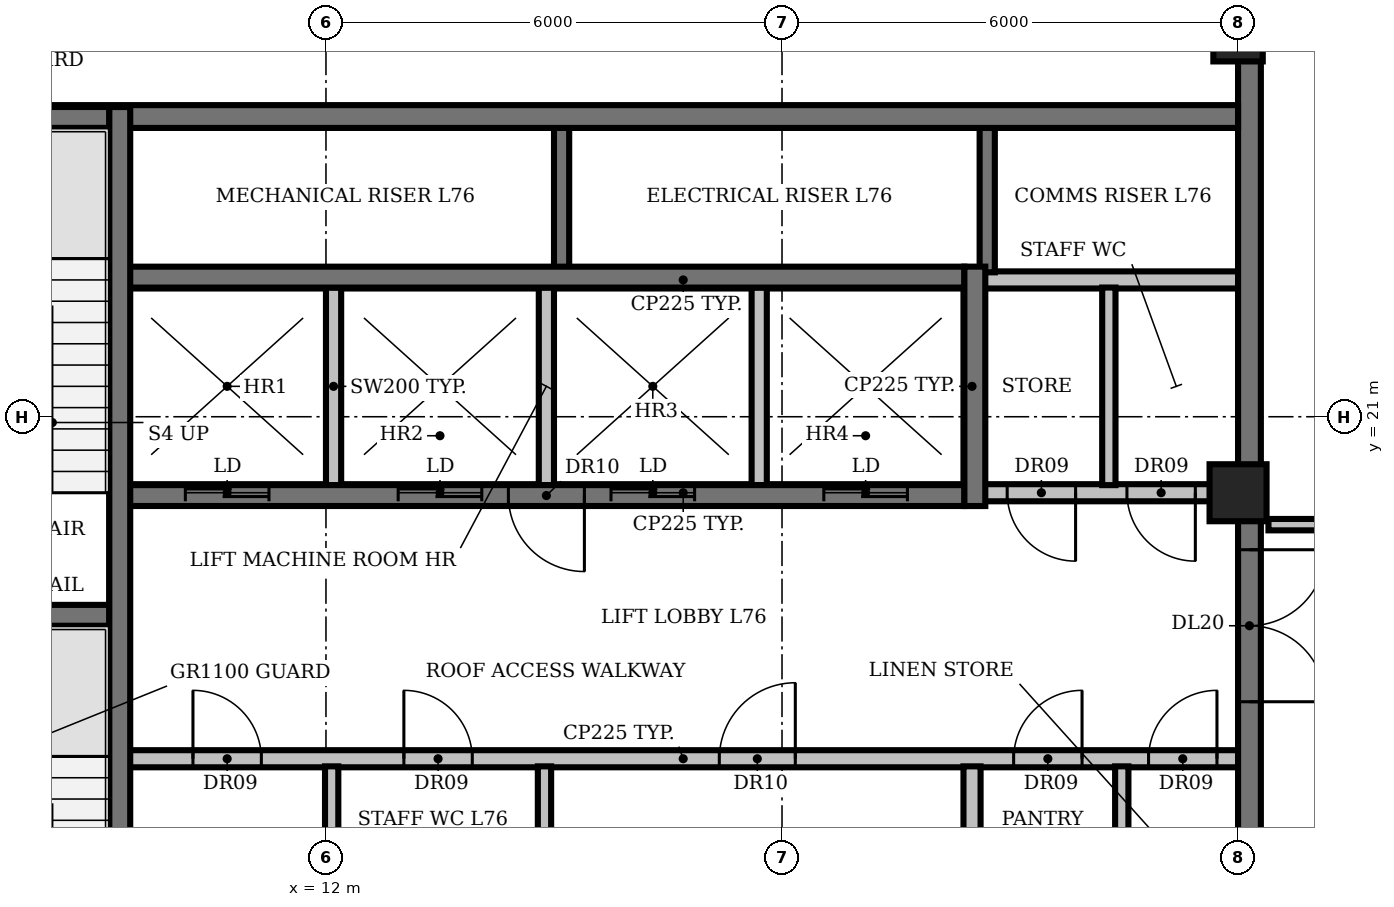
"""IFC4 building model, lengths in metres.
Left out: names, types, materials, properties, quantities, classifications, styles, units other than length and angle.
Written with IfcOpenShell. Run it as: python <this file> out.ifc"""

import sys

from ifc_helpers import new_model, si_unit, direction, frame, frame_2d, origin, origin_2d, place, context, subcontext, project, spatial, rectangle, circle, extrude, element, fill, save


model = new_model("IFC4")
c1 = context("Model", 3, precision=1e-05, world=origin(), true_north=direction((0.0, 1.0)))
c2 = subcontext(c1, "Body", "Model", "MODEL_VIEW")
j1 = project(units=[si_unit("LENGTHUNIT", "METRE"), si_unit("PLANEANGLEUNIT", "RADIAN")], contexts=[c1])
p1 = place(None, origin())
s1 = spatial("IfcSite", under=j1, at=p1, CompositionType="ELEMENT")
p2 = place(p1, origin())
s2 = spatial("IfcBuilding", under=s1, at=p2, CompositionType="ELEMENT")
p3 = place(p2, frame((0.0, 0.0, 339.8)))
s3 = spatial("IfcBuildingStorey", under=s2, at=p3, CompositionType="ELEMENT", Elevation=339.8)
p4 = place(p3, frame((24.0, 20.0, 0.0), z_axis=(0.0, 0.0, 1.0), x_axis=(1.0, 0.0, 0.0)))
e1 = element("IfcColumn", 1, at=p4, inside=s3, PredefinedType="COLUMN", context=c2, shape_type="SweptSolid", body=[
    extrude(circle(Radius=0.375, at=origin_2d()), origin(), (0.0, 0.0, 1.0), 3.9),
])
p5 = place(p3, frame((24.0, 26.0, 0.0), z_axis=(0.0, 0.0, 1.0), x_axis=(1.0, 0.0, 0.0)))
e2 = element("IfcColumn", 2, at=p5, inside=s3, PredefinedType="COLUMN", context=c2, shape_type="SweptSolid", body=[
    extrude(rectangle(XDim=0.65, YDim=0.65, at=origin_2d()), origin(), (0.0, 0.0, 1.0), 3.9),
])
p6 = place(p3, frame((9.4, 16.5, 0.0), z_axis=(0.0, 0.0, 1.0), x_axis=(1.0, 0.0, 0.0)))
e3 = element("IfcWall", 3, at=p6, inside=s3, PredefinedType="PARTITIONING", context=c2, shape_type="SweptSolid", body=[
    extrude(rectangle(XDim=14.6, YDim=0.225, at=frame_2d((7.3, 0.0))), origin(), (0.0, 0.0, 1.0), 3.9),
])
p7 = place(p6, frame((0.85, 0.0, 0.0)))
e4 = element("IfcOpeningElement", 4, at=p7, cuts=e3, PredefinedType="OPENING", context=c2, shape_type="SweptSolid", body=[
    extrude(rectangle(XDim=0.9, YDim=2.1, at=frame_2d((0.45, 1.05))), frame((0.0, 0.123, 0.0), z_axis=(0.0, -1.0, 0.0), x_axis=(1.0, 0.0, 0.0)), (0.0, 0.0, 1.0), 0.245),
])
p8 = place(p6, frame((3.625, 0.0, 0.0)))
e5 = element("IfcOpeningElement", 5, at=p8, cuts=e3, PredefinedType="OPENING", context=c2, shape_type="SweptSolid", body=[
    extrude(rectangle(XDim=0.9, YDim=2.1, at=frame_2d((0.45, 1.05))), frame((0.0, 0.123, 0.0), z_axis=(0.0, -1.0, 0.0), x_axis=(1.0, 0.0, 0.0)), (0.0, 0.0, 1.0), 0.245),
])
p9 = place(p6, frame((7.775, 0.0, 0.0)))
e6 = element("IfcOpeningElement", 6, at=p9, cuts=e3, PredefinedType="OPENING", context=c2, shape_type="SweptSolid", body=[
    extrude(rectangle(XDim=1.0, YDim=2.1, at=frame_2d((0.5, 1.05))), frame((0.0, 0.123, 0.0), z_axis=(0.0, -1.0, 0.0), x_axis=(1.0, 0.0, 0.0)), (0.0, 0.0, 1.0), 0.245),
])
p10 = place(p6, frame((11.647, 0.0, 0.0)))
e7 = element("IfcOpeningElement", 7, at=p10, cuts=e3, PredefinedType="OPENING", context=c2, shape_type="SweptSolid", body=[
    extrude(rectangle(XDim=0.9, YDim=2.1, at=frame_2d((0.45, 1.05))), frame((0.0, 0.123, 0.0), z_axis=(0.0, -1.0, 0.0), x_axis=(1.0, 0.0, 0.0)), (0.0, 0.0, 1.0), 0.245),
])
p11 = place(p6, frame((13.423, 0.0, 0.0)))
e8 = element("IfcOpeningElement", 8, at=p11, cuts=e3, PredefinedType="OPENING", context=c2, shape_type="SweptSolid", body=[
    extrude(rectangle(XDim=0.9, YDim=2.1, at=frame_2d((0.45, 1.05))), frame((0.0, 0.123, 0.0), z_axis=(0.0, -1.0, 0.0), x_axis=(1.0, 0.0, 0.0)), (0.0, 0.0, 1.0), 0.245),
])
p12 = place(p3, frame((6.0, 18.375, 0.0), z_axis=(0.0, 0.0, 1.0), x_axis=(1.0, 0.0, 0.0)))
e9 = element("IfcWall", 9, at=p12, inside=s3, PredefinedType="SHEAR", context=c2, shape_type="SweptSolid", body=[
    extrude(rectangle(XDim=3.15, YDim=0.25, at=frame_2d((1.575, 0.0))), origin(), (0.0, 0.0, 1.0), 3.9),
])
p13 = place(p3, frame((24.0, 20.0, 0.0), z_axis=(0.0, 0.0, 1.0), x_axis=(-1.0, 0.0, 0.0)))
e10 = element("IfcWall", 10, at=p13, inside=s3, PredefinedType="PARTITIONING", context=c2, shape_type="SweptSolid", body=[
    extrude(rectangle(XDim=14.6, YDim=0.225, at=frame_2d((7.3, 0.0))), origin(), (0.0, 0.0, 1.0), 3.9),
])
p14 = place(p13, frame((12.75, 0.0, 0.0)))
e11 = element("IfcOpeningElement", 11, at=p14, cuts=e10, PredefinedType="OPENING", context=c2, shape_type="SweptSolid", body=[
    extrude(rectangle(XDim=1.1, YDim=2.1, at=frame_2d((0.55, 1.05))), frame((0.0, 0.123, 0.0), z_axis=(0.0, -1.0, 0.0), x_axis=(1.0, 0.0, 0.0)), (0.0, 0.0, 1.0), 0.245),
])
p15 = place(p13, frame((9.95, 0.0, 0.0)))
e12 = element("IfcOpeningElement", 12, at=p15, cuts=e10, PredefinedType="OPENING", context=c2, shape_type="SweptSolid", body=[
    extrude(rectangle(XDim=1.1, YDim=2.1, at=frame_2d((0.55, 1.05))), frame((0.0, 0.123, 0.0), z_axis=(0.0, -1.0, 0.0), x_axis=(1.0, 0.0, 0.0)), (0.0, 0.0, 1.0), 0.245),
])
p16 = place(p13, frame((7.15, 0.0, 0.0)))
e13 = element("IfcOpeningElement", 13, at=p16, cuts=e10, PredefinedType="OPENING", context=c2, shape_type="SweptSolid", body=[
    extrude(rectangle(XDim=1.1, YDim=2.1, at=frame_2d((0.55, 1.05))), frame((0.0, 0.123, 0.0), z_axis=(0.0, -1.0, 0.0), x_axis=(1.0, 0.0, 0.0)), (0.0, 0.0, 1.0), 0.245),
])
p17 = place(p13, frame((4.35, 0.0, 0.0)))
e14 = element("IfcOpeningElement", 14, at=p17, cuts=e10, PredefinedType="OPENING", context=c2, shape_type="SweptSolid", body=[
    extrude(rectangle(XDim=1.1, YDim=2.1, at=frame_2d((0.55, 1.05))), frame((0.0, 0.123, 0.0), z_axis=(0.0, -1.0, 0.0), x_axis=(1.0, 0.0, 0.0)), (0.0, 0.0, 1.0), 0.245),
])
p18 = place(p13, frame((2.137, 0.0, 0.0)))
e15 = element("IfcOpeningElement", 15, at=p18, cuts=e10, PredefinedType="OPENING", context=c2, shape_type="SweptSolid", body=[
    extrude(rectangle(XDim=0.9, YDim=2.1, at=frame_2d((0.45, 1.05))), frame((0.0, 0.123, 0.0), z_axis=(0.0, -1.0, 0.0), x_axis=(1.0, 0.0, 0.0)), (0.0, 0.0, 1.0), 0.245),
])
p19 = place(p13, frame((0.562, 0.0, 0.0)))
e16 = element("IfcOpeningElement", 16, at=p19, cuts=e10, PredefinedType="OPENING", context=c2, shape_type="SweptSolid", body=[
    extrude(rectangle(XDim=0.9, YDim=2.1, at=frame_2d((0.45, 1.05))), frame((0.0, 0.123, 0.0), z_axis=(0.0, -1.0, 0.0), x_axis=(1.0, 0.0, 0.0)), (0.0, 0.0, 1.0), 0.245),
])
p20 = place(p3, frame((9.4, 22.8, 0.0), z_axis=(0.0, 0.0, 1.0), x_axis=(1.0, 0.0, 0.0)))
e17 = element("IfcWall", 17, at=p20, inside=s3, PredefinedType="PARTITIONING", context=c2, shape_type="SweptSolid", body=[
    extrude(rectangle(XDim=14.6, YDim=0.225, at=frame_2d((7.3, 0.0))), origin(), (0.0, 0.0, 1.0), 3.9),
])
p21 = place(p3, frame((9.275, 18.375, 0.0), z_axis=(0.0, 0.0, 1.0), x_axis=(0.0, -1.0, 0.0)))
e18 = element("IfcWall", 18, at=p21, inside=s3, PredefinedType="SHEAR", context=c2, shape_type="SweptSolid", body=[
    extrude(rectangle(XDim=6.55, YDim=0.25, at=frame_2d((3.275, 0.0))), origin(), (0.0, 0.0, 1.0), 3.9),
])
p22 = place(p21, frame((5.075, 0.0, 0.0)))
e19 = element("IfcOpeningElement", 19, at=p22, cuts=e18, PredefinedType="OPENING", context=c2, shape_type="SweptSolid", body=[
    extrude(rectangle(XDim=1.0, YDim=2.1, at=frame_2d((0.5, 1.05))), frame((0.0, 0.135, 0.0), z_axis=(0.0, -1.0, 0.0), x_axis=(1.0, 0.0, 0.0)), (0.0, 0.0, 1.0), 0.27),
])
p23 = place(p3, frame((9.275, 18.375, 0.0), z_axis=(0.0, 0.0, 1.0), x_axis=(0.0, 1.0, 0.0)))
e20 = element("IfcWall", 20, at=p23, inside=s3, PredefinedType="SHEAR", context=c2, shape_type="SweptSolid", body=[
    extrude(rectangle(XDim=6.425, YDim=0.25, at=frame_2d((3.212, 0.0))), origin(), (0.0, 0.0, 1.0), 3.9),
])
p24 = place(p3, frame((12.075, 13.8, 0.0), z_axis=(0.0, 0.0, 1.0), x_axis=(0.0, 1.0, 0.0)))
e21 = element("IfcWall", 21, at=p24, inside=s3, PredefinedType="PARTITIONING", context=c2, shape_type="SweptSolid", body=[
    extrude(rectangle(XDim=2.6, YDim=0.175, at=frame_2d((1.3, 0.0))), origin(), (0.0, 0.0, 1.0), 3.9),
])
p25 = place(p3, frame((12.1, 20.1, 0.0), z_axis=(0.0, 0.0, 1.0), x_axis=(0.0, 1.0, 0.0)))
e22 = element("IfcWall", 22, at=p25, inside=s3, PredefinedType="SOLIDWALL", context=c2, shape_type="SweptSolid", body=[
    extrude(rectangle(XDim=2.6, YDim=0.2, at=frame_2d((1.3, 0.0))), origin(), (0.0, 0.0, 1.0), 3.9),
])
p26 = place(p3, frame((14.875, 13.8, 0.0), z_axis=(0.0, 0.0, 1.0), x_axis=(0.0, 1.0, 0.0)))
e23 = element("IfcWall", 23, at=p26, inside=s3, PredefinedType="PARTITIONING", context=c2, shape_type="SweptSolid", body=[
    extrude(rectangle(XDim=2.6, YDim=0.175, at=frame_2d((1.3, 0.0))), origin(), (0.0, 0.0, 1.0), 3.9),
])
p27 = place(p3, frame((14.9, 20.1, 0.0), z_axis=(0.0, 0.0, 1.0), x_axis=(0.0, 1.0, 0.0)))
e24 = element("IfcWall", 24, at=p27, inside=s3, PredefinedType="SOLIDWALL", context=c2, shape_type="SweptSolid", body=[
    extrude(rectangle(XDim=2.6, YDim=0.2, at=frame_2d((1.3, 0.0))), origin(), (0.0, 0.0, 1.0), 3.9),
])
p28 = place(p3, frame((15.1, 22.9, 0.0), z_axis=(0.0, 0.0, 1.0), x_axis=(0.0, 1.0, 0.0)))
e25 = element("IfcWall", 25, at=p28, inside=s3, PredefinedType="SHEAR", context=c2, shape_type="SweptSolid", body=[
    extrude(rectangle(XDim=1.9, YDim=0.2, at=frame_2d((0.95, 0.0))), origin(), (0.0, 0.0, 1.0), 3.9),
])
p29 = place(p3, frame((17.7, 20.1, 0.0), z_axis=(0.0, 0.0, 1.0), x_axis=(0.0, 1.0, 0.0)))
e26 = element("IfcWall", 26, at=p29, inside=s3, PredefinedType="SOLIDWALL", context=c2, shape_type="SweptSolid", body=[
    extrude(rectangle(XDim=2.6, YDim=0.2, at=frame_2d((1.3, 0.0))), origin(), (0.0, 0.0, 1.0), 3.9),
])
for number, where, z_axis, x_axis in (
    (27, (20.5, 13.8, 0.0), (0.0, 0.0, 1.0), (0.0, 1.0, 0.0)),
    (28, (20.5, 20.1, 0.0), (0.0, 0.0, 1.0), (0.0, 1.0, 0.0)),
):
    element("IfcWall", number, at=place(p3, frame(where, z_axis=z_axis, x_axis=x_axis)), inside=s3, PredefinedType="PARTITIONING", context=c2, shape_type="SweptSolid", body=[
        extrude(rectangle(XDim=2.6, YDim=0.225, at=frame_2d((1.3, 0.0))), origin(), (0.0, 0.0, 1.0), 3.9),
    ])
p30 = place(p3, frame((20.7, 22.9, 0.0), z_axis=(0.0, 0.0, 1.0), x_axis=(0.0, 1.0, 0.0)))
e29 = element("IfcWall", 29, at=p30, inside=s3, PredefinedType="SHEAR", context=c2, shape_type="SweptSolid", body=[
    extrude(rectangle(XDim=1.9, YDim=0.2, at=frame_2d((0.95, 0.0))), origin(), (0.0, 0.0, 1.0), 3.9),
])
for number, where, z_axis, x_axis in (
    (30, (22.3, 20.1, 0.0), (0.0, 0.0, 1.0), (0.0, 1.0, 0.0)),
    (31, (22.47, 13.8, 0.0), (0.0, 0.0, 1.0), (0.0, 1.0, 0.0)),
):
    element("IfcWall", number, at=place(p3, frame(where, z_axis=z_axis, x_axis=x_axis)), inside=s3, PredefinedType="PARTITIONING", context=c2, shape_type="SweptSolid", body=[
        extrude(rectangle(XDim=2.6, YDim=0.175, at=frame_2d((1.3, 0.0))), origin(), (0.0, 0.0, 1.0), 3.9),
    ])
p31 = place(p3, frame((24.15, 25.705, 0.0), z_axis=(0.0, 0.0, 1.0), x_axis=(0.0, -1.0, 0.0)))
e32 = element("IfcWall", 32, at=p31, inside=s3, PredefinedType="SHEAR", context=c2, shape_type="SweptSolid", body=[
    extrude(rectangle(XDim=20.605, YDim=0.3, at=frame_2d((10.302, 0.0))), origin(), (0.0, 0.0, 1.0), 3.9),
])
p32 = place(p31, frame((18.555, 0.0, 0.0)))
e33 = element("IfcOpeningElement", 33, at=p32, cuts=e32, PredefinedType="OPENING", context=c2, shape_type="SweptSolid", body=[
    extrude(rectangle(XDim=1.5, YDim=2.1, at=frame_2d((0.75, 1.05))), frame((0.0, 0.16, 0.0), z_axis=(0.0, -1.0, 0.0), x_axis=(1.0, 0.0, 0.0)), (0.0, 0.0, 1.0), 0.32),
])
p33 = place(p31, frame((12.455, 0.0, 0.0)))
e34 = element("IfcOpeningElement", 34, at=p33, cuts=e32, PredefinedType="OPENING", context=c2, shape_type="SweptSolid", body=[
    extrude(rectangle(XDim=0.9, YDim=2.1, at=frame_2d((0.45, 1.05))), frame((0.0, 0.16, 0.0), z_axis=(0.0, -1.0, 0.0), x_axis=(1.0, 0.0, 0.0)), (0.0, 0.0, 1.0), 0.32),
])
p34 = place(p31, frame((6.455, 0.0, 0.0)))
e35 = element("IfcOpeningElement", 35, at=p34, cuts=e32, PredefinedType="OPENING", context=c2, shape_type="SweptSolid", body=[
    extrude(rectangle(XDim=2.0, YDim=2.1, at=frame_2d((1.0, 1.05))), frame((0.0, 0.16, 0.0), z_axis=(0.0, -1.0, 0.0), x_axis=(1.0, 0.0, 0.0)), (0.0, 0.0, 1.0), 0.32),
])
p35 = place(p3, frame((6.0, 24.95, 0.0), z_axis=(0.0, 0.0, 1.0), x_axis=(1.0, 0.0, 0.0)))
e36 = element("IfcWall", 36, at=p35, inside=s3, PredefinedType="SHEAR", context=c2, shape_type="SweptSolid", body=[
    extrude(rectangle(XDim=18.0, YDim=0.3, at=frame_2d((9.0, 0.0))), origin(), (0.0, 0.0, 1.0), 3.9),
])
p36 = place(p3, frame((6.0, 18.387, 4.2), z_axis=(0.0, 0.0, 1.0), x_axis=(1.0, 0.0, 0.0)))
e37 = element("IfcWall", 37, at=p36, inside=s3, PredefinedType="SHEAR", context=c2, shape_type="SweptSolid", body=[
    extrude(rectangle(XDim=3.15, YDim=0.275, at=frame_2d((1.575, 0.0))), origin(), (0.0, 0.0, 1.0), 3.0),
])
p37 = place(p3, frame((20.4, 19.963, 4.2), z_axis=(0.0, 0.0, 1.0), x_axis=(-1.0, 0.0, 0.0)))
e38 = element("IfcWall", 38, at=p37, inside=s3, PredefinedType="SHEAR", context=c2, shape_type="SweptSolid", body=[
    extrude(rectangle(XDim=11.0, YDim=0.275, at=frame_2d((5.5, 0.0))), origin(), (0.0, 0.0, 1.0), 3.0),
])
p38 = place(p37, frame((5.0, 0.0, 0.0)))
e39 = element("IfcOpeningElement", 39, at=p38, cuts=e38, PredefinedType="OPENING", context=c2, shape_type="SweptSolid", body=[
    extrude(rectangle(XDim=1.0, YDim=2.1, at=frame_2d((0.5, 1.05))), frame((0.0, 0.147, 0.0), z_axis=(0.0, -1.0, 0.0), x_axis=(1.0, 0.0, 0.0)), (0.0, 0.0, 1.0), 0.295),
])
p39 = place(p3, frame((9.4, 22.837, 4.2), z_axis=(0.0, 0.0, 1.0), x_axis=(1.0, 0.0, 0.0)))
e40 = element("IfcWall", 40, at=p39, inside=s3, PredefinedType="SHEAR", context=c2, shape_type="SweptSolid", body=[
    extrude(rectangle(XDim=11.0, YDim=0.275, at=frame_2d((5.5, 0.0))), origin(), (0.0, 0.0, 1.0), 3.0),
])
p40 = place(p3, frame((6.0, 24.938, 4.2), z_axis=(0.0, 0.0, 1.0), x_axis=(1.0, 0.0, 0.0)))
e41 = element("IfcWall", 41, at=p40, inside=s3, PredefinedType="SHEAR", context=c2, shape_type="SweptSolid", body=[
    extrude(rectangle(XDim=3.15, YDim=0.275, at=frame_2d((1.575, 0.0))), origin(), (0.0, 0.0, 1.0), 3.0),
])
p41 = place(p3, frame((9.287, 5.125, 4.2), z_axis=(0.0, 0.0, 1.0), x_axis=(0.0, 1.0, 0.0)))
e42 = element("IfcWall", 42, at=p41, inside=s3, PredefinedType="SHEAR", context=c2, shape_type="SweptSolid", body=[
    extrude(rectangle(XDim=19.95, YDim=0.275, at=frame_2d((9.975, 0.0))), origin(), (0.0, 0.0, 1.0), 3.0),
])
p42 = place(p3, frame((20.537, 19.825, 4.2), z_axis=(0.0, 0.0, 1.0), x_axis=(0.0, 1.0, 0.0)))
e43 = element("IfcWall", 43, at=p42, inside=s3, PredefinedType="SHEAR", context=c2, shape_type="SweptSolid", body=[
    extrude(rectangle(XDim=3.15, YDim=0.275, at=frame_2d((1.575, 0.0))), origin(), (0.0, 0.0, 1.0), 3.0),
])
p43 = place(p3, frame((24.4, 19.58, 0.0), z_axis=(0.0, 0.0, 1.0), x_axis=(1.0, 0.0, 0.0)))
e44 = element("IfcWall", 44, at=p43, inside=s3, PredefinedType="PARTITIONING", context=c2, shape_type="SweptSolid", body=[
    extrude(rectangle(XDim=1.41, YDim=0.15, at=frame_2d((0.705, 0.0))), origin(), (0.0, 0.0, 1.0), 2.95),
])
p44 = place(p7, origin())
e45 = element("IfcDoor", 45, at=p44, inside=s3, OperationType="SINGLE_SWING_LEFT", PredefinedType="DOOR", context=c2, shape_type="SweptSolid", body=[
    extrude(rectangle(XDim=0.9, YDim=2.1, at=frame_2d((0.45, 1.05))), frame((0.0, 0.025, 0.0), z_axis=(0.0, -1.0, 0.0), x_axis=(1.0, 0.0, 0.0)), (0.0, 0.0, 1.0), 0.05),
])
fill(e4, e45)
p45 = place(p8, origin())
e46 = element("IfcDoor", 46, at=p45, inside=s3, OperationType="SINGLE_SWING_LEFT", PredefinedType="DOOR", context=c2, shape_type="SweptSolid", body=[
    extrude(rectangle(XDim=0.9, YDim=2.1, at=frame_2d((0.45, 1.05))), frame((0.0, 0.025, 0.0), z_axis=(0.0, -1.0, 0.0), x_axis=(1.0, 0.0, 0.0)), (0.0, 0.0, 1.0), 0.05),
])
fill(e5, e46)
p46 = place(p9, origin())
e47 = element("IfcDoor", 47, at=p46, inside=s3, OperationType="SINGLE_SWING_RIGHT", PredefinedType="DOOR", context=c2, shape_type="SweptSolid", body=[
    extrude(rectangle(XDim=1.0, YDim=2.1, at=frame_2d((0.5, 1.05))), frame((0.0, 0.025, 0.0), z_axis=(0.0, -1.0, 0.0), x_axis=(1.0, 0.0, 0.0)), (0.0, 0.0, 1.0), 0.05),
])
fill(e6, e47)
p47 = place(p10, origin())
e48 = element("IfcDoor", 48, at=p47, inside=s3, OperationType="SINGLE_SWING_RIGHT", PredefinedType="DOOR", context=c2, shape_type="SweptSolid", body=[
    extrude(rectangle(XDim=0.9, YDim=2.1, at=frame_2d((0.45, 1.05))), frame((0.0, 0.025, 0.0), z_axis=(0.0, -1.0, 0.0), x_axis=(1.0, 0.0, 0.0)), (0.0, 0.0, 1.0), 0.05),
])
fill(e7, e48)
p48 = place(p11, origin())
e49 = element("IfcDoor", 49, at=p48, inside=s3, OperationType="SINGLE_SWING_RIGHT", PredefinedType="DOOR", context=c2, shape_type="SweptSolid", body=[
    extrude(rectangle(XDim=0.9, YDim=2.1, at=frame_2d((0.45, 1.05))), frame((0.0, 0.025, 0.0), z_axis=(0.0, -1.0, 0.0), x_axis=(1.0, 0.0, 0.0)), (0.0, 0.0, 1.0), 0.05),
])
fill(e8, e49)
p49 = place(p14, origin())
e50 = element("IfcDoor", 50, at=p49, inside=s3, OperationType="DOUBLE_DOOR_SLIDING", PredefinedType="DOOR", context=c2, shape_type="SweptSolid", body=[
    extrude(rectangle(XDim=1.1, YDim=2.1, at=frame_2d((0.55, 1.05))), frame((0.0, 0.025, 0.0), z_axis=(0.0, -1.0, 0.0), x_axis=(1.0, 0.0, 0.0)), (0.0, 0.0, 1.0), 0.05),
])
fill(e11, e50)
p50 = place(p15, origin())
e51 = element("IfcDoor", 51, at=p50, inside=s3, OperationType="DOUBLE_DOOR_SLIDING", PredefinedType="DOOR", context=c2, shape_type="SweptSolid", body=[
    extrude(rectangle(XDim=1.1, YDim=2.1, at=frame_2d((0.55, 1.05))), frame((0.0, 0.025, 0.0), z_axis=(0.0, -1.0, 0.0), x_axis=(1.0, 0.0, 0.0)), (0.0, 0.0, 1.0), 0.05),
])
fill(e12, e51)
p51 = place(p16, origin())
e52 = element("IfcDoor", 52, at=p51, inside=s3, OperationType="DOUBLE_DOOR_SLIDING", PredefinedType="DOOR", context=c2, shape_type="SweptSolid", body=[
    extrude(rectangle(XDim=1.1, YDim=2.1, at=frame_2d((0.55, 1.05))), frame((0.0, 0.025, 0.0), z_axis=(0.0, -1.0, 0.0), x_axis=(1.0, 0.0, 0.0)), (0.0, 0.0, 1.0), 0.05),
])
fill(e13, e52)
p52 = place(p17, origin())
e53 = element("IfcDoor", 53, at=p52, inside=s3, OperationType="DOUBLE_DOOR_SLIDING", PredefinedType="DOOR", context=c2, shape_type="SweptSolid", body=[
    extrude(rectangle(XDim=1.1, YDim=2.1, at=frame_2d((0.55, 1.05))), frame((0.0, 0.025, 0.0), z_axis=(0.0, -1.0, 0.0), x_axis=(1.0, 0.0, 0.0)), (0.0, 0.0, 1.0), 0.05),
])
fill(e14, e53)
p53 = place(p18, origin())
e54 = element("IfcDoor", 54, at=p53, inside=s3, OperationType="SINGLE_SWING_LEFT", PredefinedType="DOOR", context=c2, shape_type="SweptSolid", body=[
    extrude(rectangle(XDim=0.9, YDim=2.1, at=frame_2d((0.45, 1.05))), frame((0.0, 0.025, 0.0), z_axis=(0.0, -1.0, 0.0), x_axis=(1.0, 0.0, 0.0)), (0.0, 0.0, 1.0), 0.05),
])
fill(e15, e54)
p54 = place(p19, origin())
e55 = element("IfcDoor", 55, at=p54, inside=s3, OperationType="SINGLE_SWING_LEFT", PredefinedType="DOOR", context=c2, shape_type="SweptSolid", body=[
    extrude(rectangle(XDim=0.9, YDim=2.1, at=frame_2d((0.45, 1.05))), frame((0.0, 0.025, 0.0), z_axis=(0.0, -1.0, 0.0), x_axis=(1.0, 0.0, 0.0)), (0.0, 0.0, 1.0), 0.05),
])
fill(e16, e55)
p55 = place(p34, origin())
e56 = element("IfcDoor", 56, at=p55, inside=s3, OperationType="DOUBLE_DOOR_SINGLE_SWING", PredefinedType="DOOR", context=c2, shape_type="SweptSolid", body=[
    extrude(rectangle(XDim=2.0, YDim=2.1, at=frame_2d((1.0, 1.05))), frame((0.0, 0.025, 0.0), z_axis=(0.0, -1.0, 0.0), x_axis=(1.0, 0.0, 0.0)), (0.0, 0.0, 1.0), 0.05),
])
fill(e35, e56)
p56 = place(p38, origin())
e57 = element("IfcDoor", 57, at=p56, inside=s3, OperationType="SINGLE_SWING_LEFT", PredefinedType="DOOR", context=c2, shape_type="SweptSolid", body=[
    extrude(rectangle(XDim=1.0, YDim=2.1, at=frame_2d((0.5, 1.05))), frame((0.0, 0.025, 0.0), z_axis=(0.0, -1.0, 0.0), x_axis=(1.0, 0.0, 0.0)), (0.0, 0.0, 1.0), 0.05),
])
fill(e39, e57)
save(model, sys.argv[1])
